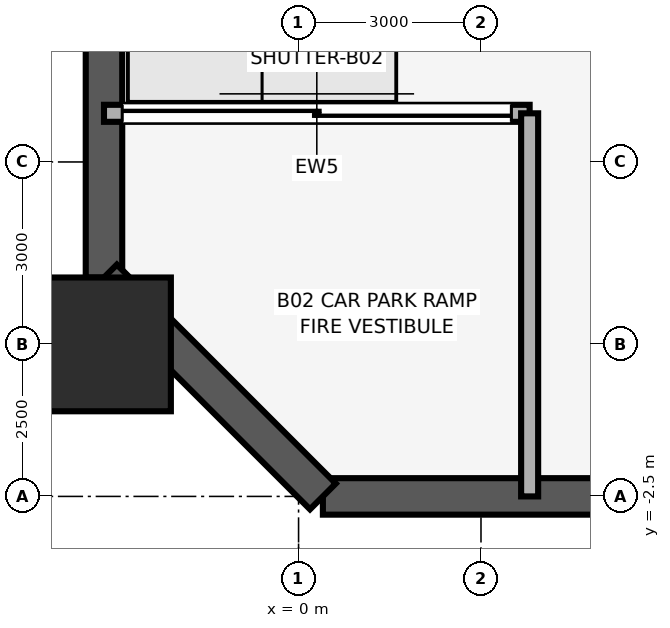
"""IFC4 building model, lengths in metres.
Left out: names, types, materials, properties, quantities, classifications, styles, units other than length and angle.
Written with IfcOpenShell. Run it as: python <this file> out.ifc"""

import sys

from ifc_helpers import new_model, si_unit, direction, frame, frame_2d, origin, origin_2d, place, context, subcontext, project, spatial, rectangle, circle, extrude, element, fill, save


model = new_model("IFC4")
c1 = context("Model", 3, precision=1e-05, world=origin(), true_north=direction((0.0, 1.0)))
c2 = subcontext(c1, "Body", "Model", "MODEL_VIEW")
j1 = project(units=[si_unit("LENGTHUNIT", "METRE"), si_unit("PLANEANGLEUNIT", "RADIAN")], contexts=[c1])
p1 = place(None, origin())
s1 = spatial("IfcSite", under=j1, at=p1, CompositionType="ELEMENT")
p2 = place(p1, origin())
s2 = spatial("IfcBuilding", under=s1, at=p2, CompositionType="ELEMENT")
p3 = place(p2, frame((0.0, 0.0, -9.2)))
s3 = spatial("IfcBuildingStorey", under=s2, at=p3, CompositionType="ELEMENT", Elevation=-9.2)
p4 = place(p3, frame((-3.2, 0.0, 0.0), z_axis=(0.0, 0.0, 1.0), x_axis=(1.0, 0.0, 0.0)))
e1 = element("IfcColumn", 1, at=p4, inside=s3, PredefinedType="USERDEFINED", context=c2, shape_type="SweptSolid", body=[
    extrude(circle(Radius=1.1, at=origin_2d()), origin(), (0.0, 0.0, 1.0), 4.3),
])
p5 = place(p3, frame((0.4, -2.5, 0.0), z_axis=(0.0, 0.0, 1.0), x_axis=(1.0, 0.0, 0.0)))
e2 = element("IfcWall", 2, at=p5, inside=s3, PredefinedType="USERDEFINED", context=c2, shape_type="SweptSolid", body=[
    extrude(rectangle(XDim=83.2, YDim=0.6, at=frame_2d((41.6, 0.0))), origin(), (0.0, 0.0, 1.0), 4.3),
])
p6 = place(p3, frame((-3.2, 48.9, 0.0), z_axis=(0.0, 0.0, 1.0), x_axis=(0.0, -1.0, 0.0)))
e3 = element("IfcWall", 3, at=p6, inside=s3, PredefinedType="USERDEFINED", context=c2, shape_type="SweptSolid", body=[
    extrude(rectangle(XDim=47.8, YDim=0.6, at=frame_2d((23.9, 0.0))), origin(), (0.0, 0.0, 1.0), 4.3),
])
p7 = place(p3, frame((-3.2, 1.1, 0.0), z_axis=(0.0, 0.0, 1.0), x_axis=(0.707082803744, -0.707130757816, 0.0)))
e4 = element("IfcWall", 4, at=p7, inside=s3, PredefinedType="USERDEFINED", context=c2, shape_type="SweptSolid", body=[
    extrude(rectangle(XDim=5.091, YDim=0.6, at=frame_2d((2.545, 0.0))), origin(), (0.0, 0.0, 1.0), 4.3),
])
p8 = place(p3, frame((-3.2, 3.8, 0.0), z_axis=(0.0, 0.0, 1.0), x_axis=(1.0, 0.0, 0.0)))
e5 = element("IfcWall", 5, at=p8, inside=s3, PredefinedType="SOLIDWALL", context=c2, shape_type="SweptSolid", body=[
    extrude(rectangle(XDim=7.0, YDim=0.28, at=frame_2d((3.5, 0.0))), origin(), (0.0, 0.0, 1.0), 4.3),
])
p9 = place(p8, frame((0.3, 0.0, 0.0)))
e6 = element("IfcOpeningElement", 6, at=p9, cuts=e5, PredefinedType="OPENING", context=c2, shape_type="SweptSolid", body=[
    extrude(rectangle(XDim=6.4, YDim=3.1, at=frame_2d((3.2, 1.55))), frame((0.0, 0.15, 0.0), z_axis=(0.0, -1.0, 0.0), x_axis=(1.0, 0.0, 0.0)), (0.0, 0.0, 1.0), 0.3),
])
p10 = place(p3, frame((3.8, 3.8, 0.0), z_axis=(0.0, 0.0, 1.0), x_axis=(0.0, -1.0, 0.0)))
e7 = element("IfcWall", 7, at=p10, inside=s3, PredefinedType="SOLIDWALL", context=c2, shape_type="SweptSolid", body=[
    extrude(rectangle(XDim=6.3, YDim=0.28, at=frame_2d((3.15, 0.0))), origin(), (0.0, 0.0, 1.0), 4.3),
])
p11 = place(p9, origin())
e8 = element("IfcDoor", 8, at=p11, inside=s3, OperationType="SINGLE_SWING_LEFT", PredefinedType="GATE", context=c2, shape_type="SweptSolid", body=[
    extrude(rectangle(XDim=6.4, YDim=3.1, at=frame_2d((3.2, 1.55))), frame((0.0, 0.025, 0.0), z_axis=(0.0, -1.0, 0.0), x_axis=(1.0, 0.0, 0.0)), (0.0, 0.0, 1.0), 0.05),
])
fill(e6, e8)
save(model, sys.argv[1])
